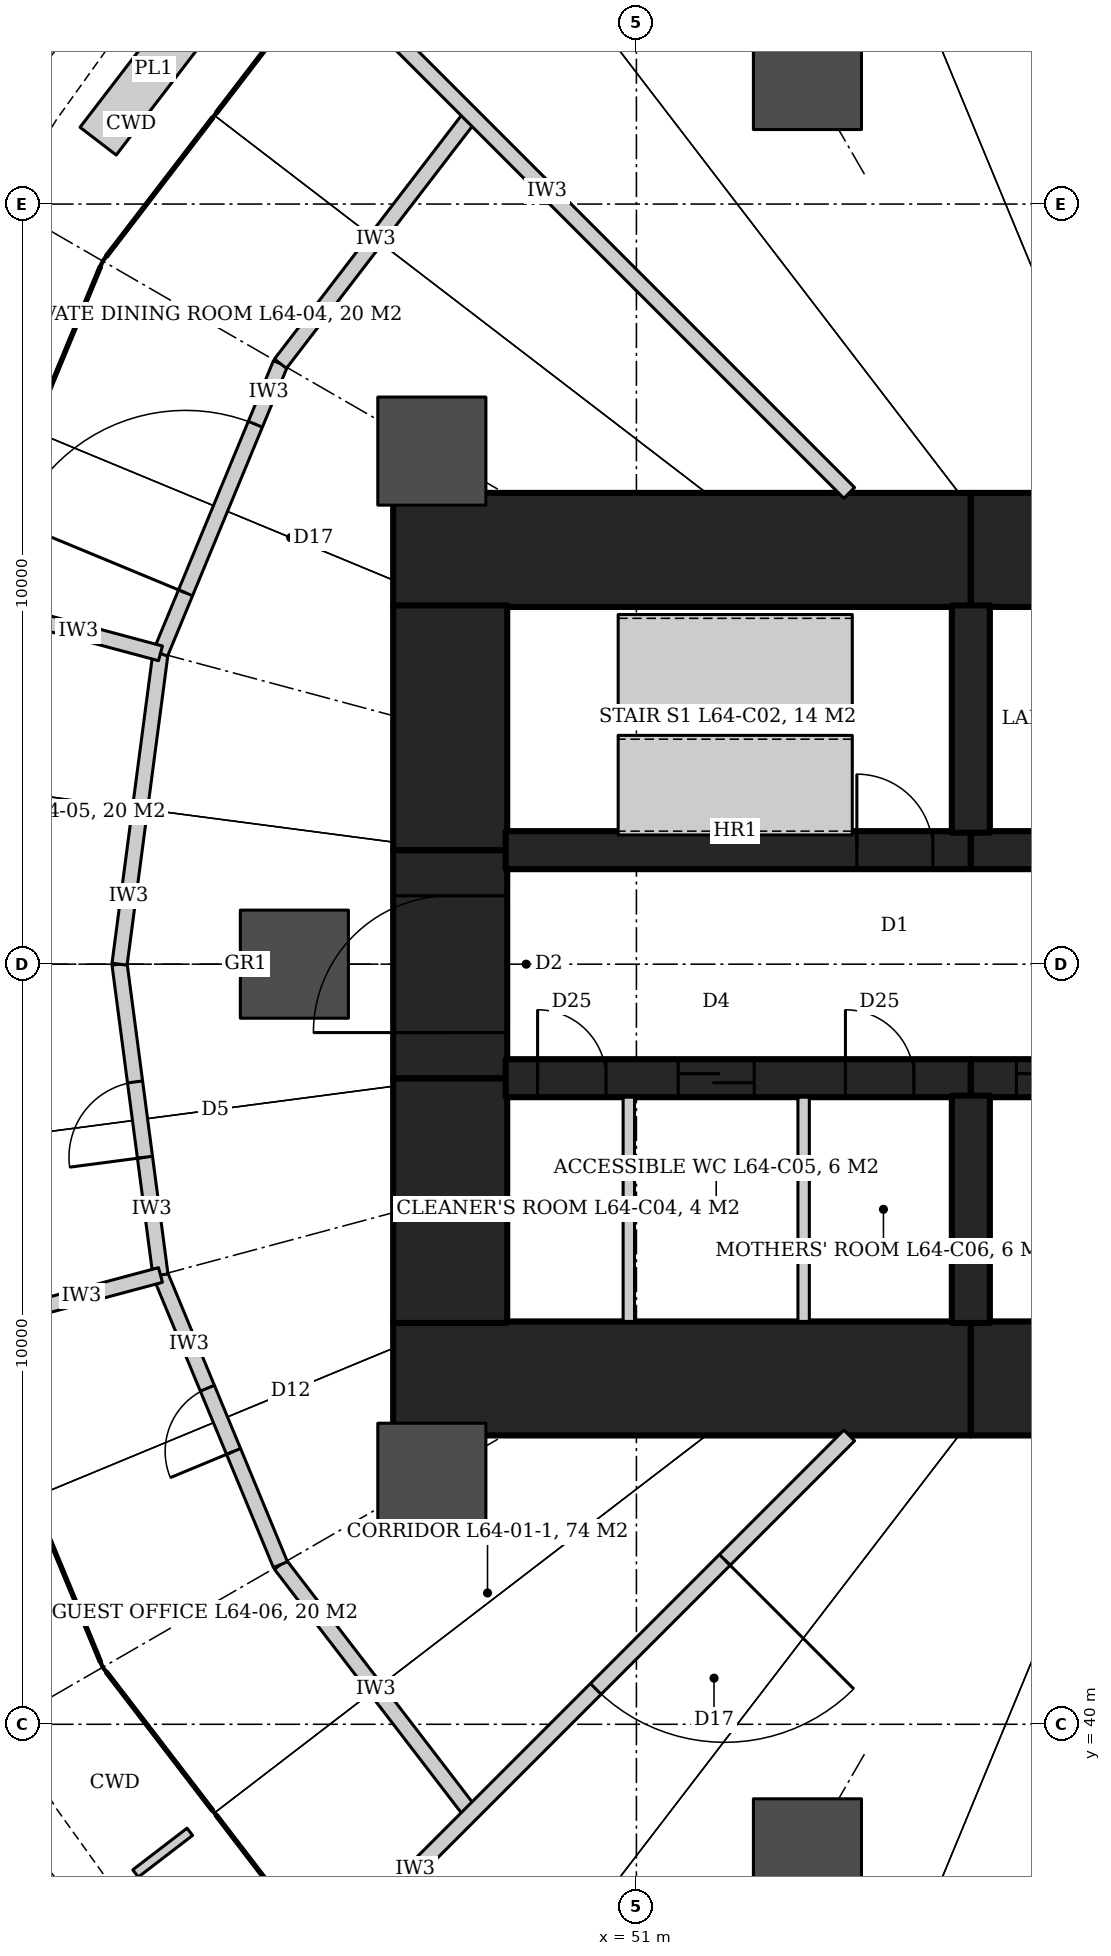
"""IFC4 building model, lengths in metres.
Left out: names, types, materials, properties, quantities, classifications, styles, units other than length and angle.
Written with IfcOpenShell. Run it as: python <this file> out.ifc"""

import sys

from ifc_helpers import new_model, si_unit, direction, frame, frame_2d, origin, origin_2d, place, context, subcontext, project, spatial, rectangle, hollow_circle, extrude, element, fill, save


model = new_model("IFC4")
c1 = context("Model", 3, precision=1e-05, world=origin(), true_north=direction((0.0, 1.0)))
c2 = subcontext(c1, "Body", "Model", "MODEL_VIEW")
j1 = project(units=[si_unit("LENGTHUNIT", "METRE"), si_unit("PLANEANGLEUNIT", "RADIAN")], contexts=[c1])
p1 = place(None, origin())
s1 = spatial("IfcSite", under=j1, at=p1, CompositionType="ELEMENT")
p2 = place(p1, origin())
s2 = spatial("IfcBuilding", under=s1, at=p2, CompositionType="ELEMENT")
p3 = place(p2, frame((0.0, 0.0, 278.0)))
s3 = spatial("IfcBuildingStorey", under=s2, at=p3, CompositionType="ELEMENT", Elevation=278.0)
p4 = place(p3, frame((47.8, 55.45, 0.0), z_axis=(0.0, 0.0, 1.0), x_axis=(1.0, 0.0, 0.0)))
e1 = element("IfcWall", 1, at=p4, inside=s3, PredefinedType="SHEAR", context=c2, shape_type="SweptSolid", body=[
    extrude(rectangle(XDim=7.6, YDim=1.5, at=frame_2d((3.8, 0.0))), origin(), (0.0, 0.0, 1.0), 4.2),
])
p5 = place(p3, frame((55.4, 55.45, 0.0), z_axis=(0.0, 0.0, 1.0), x_axis=(1.0, 0.0, 0.0)))
e2 = element("IfcWall", 2, at=p5, inside=s3, PredefinedType="SHEAR", context=c2, shape_type="SweptSolid", body=[
    extrude(rectangle(XDim=9.2, YDim=1.5, at=frame_2d((4.6, 0.0))), origin(), (0.0, 0.0, 1.0), 4.2),
])
p6 = place(p3, frame((47.8, 44.55, 0.0), z_axis=(0.0, 0.0, 1.0), x_axis=(1.0, 0.0, 0.0)))
e3 = element("IfcWall", 3, at=p6, inside=s3, PredefinedType="SHEAR", context=c2, shape_type="SweptSolid", body=[
    extrude(rectangle(XDim=7.6, YDim=1.5, at=frame_2d((3.8, 0.0))), origin(), (0.0, 0.0, 1.0), 4.2),
])
p7 = place(p3, frame((55.4, 44.55, 0.0), z_axis=(0.0, 0.0, 1.0), x_axis=(1.0, 0.0, 0.0)))
e4 = element("IfcWall", 4, at=p7, inside=s3, PredefinedType="SHEAR", context=c2, shape_type="SweptSolid", body=[
    extrude(rectangle(XDim=9.2, YDim=1.5, at=frame_2d((4.6, 0.0))), origin(), (0.0, 0.0, 1.0), 4.2),
])
p8 = place(p3, frame((48.55, 45.28, 0.0), z_axis=(0.0, 0.0, 1.0), x_axis=(0.0, 1.0, 0.0)))
e5 = element("IfcWall", 5, at=p8, inside=s3, PredefinedType="SHEAR", context=c2, shape_type="SweptSolid", body=[
    extrude(rectangle(XDim=3.22, YDim=1.5, at=frame_2d((1.61, 0.0))), origin(), (0.0, 0.0, 1.0), 4.2),
])
p9 = place(p3, frame((48.55, 48.5, 0.0), z_axis=(0.0, 0.0, 1.0), x_axis=(0.0, 1.0, 0.0)))
e6 = element("IfcWall", 6, at=p9, inside=s3, PredefinedType="SHEAR", context=c2, shape_type="SweptSolid", body=[
    extrude(rectangle(XDim=3.0, YDim=1.5, at=frame_2d((1.5, 0.0))), origin(), (0.0, 0.0, 1.0), 4.2),
])
p10 = place(p9, frame((0.6, 0.0, 0.0)))
e7 = element("IfcOpeningElement", 7, at=p10, cuts=e6, PredefinedType="OPENING", context=c2, shape_type="SweptSolid", body=[
    extrude(rectangle(XDim=1.8, YDim=2.1, at=frame_2d((0.9, 1.05))), frame((0.0, 0.76, 0.0), z_axis=(0.0, -1.0, 0.0), x_axis=(1.0, 0.0, 0.0)), (0.0, 0.0, 1.0), 1.52),
])
p11 = place(p3, frame((48.55, 51.5, 0.0), z_axis=(0.0, 0.0, 1.0), x_axis=(0.0, 1.0, 0.0)))
e8 = element("IfcWall", 8, at=p11, inside=s3, PredefinedType="SHEAR", context=c2, shape_type="SweptSolid", body=[
    extrude(rectangle(XDim=3.22, YDim=1.5, at=frame_2d((1.61, 0.0))), origin(), (0.0, 0.0, 1.0), 4.2),
])
p12 = place(p3, frame((49.28, 51.5, 0.0), z_axis=(0.0, 0.0, 1.0), x_axis=(1.0, 0.0, 0.0)))
e9 = element("IfcWall", 9, at=p12, inside=s3, PredefinedType="SHEAR", context=c2, shape_type="SweptSolid", body=[
    extrude(rectangle(XDim=6.12, YDim=0.5, at=frame_2d((3.06, 0.0))), origin(), (0.0, 0.0, 1.0), 4.2),
])
p13 = place(p12, frame((4.62, 0.0, 0.0)))
e10 = element("IfcOpeningElement", 10, at=p13, cuts=e9, PredefinedType="OPENING", context=c2, shape_type="SweptSolid", body=[
    extrude(rectangle(XDim=1.0, YDim=2.1, at=frame_2d((0.5, 1.05))), frame((0.0, 0.26, 0.0), z_axis=(0.0, -1.0, 0.0), x_axis=(1.0, 0.0, 0.0)), (0.0, 0.0, 1.0), 0.52),
])
p14 = place(p3, frame((55.4, 51.5, 0.0), z_axis=(0.0, 0.0, 1.0), x_axis=(1.0, 0.0, 0.0)))
e11 = element("IfcWall", 11, at=p14, inside=s3, PredefinedType="SHEAR", context=c2, shape_type="SweptSolid", body=[
    extrude(rectangle(XDim=9.2, YDim=0.5, at=frame_2d((4.6, 0.0))), origin(), (0.0, 0.0, 1.0), 4.2),
])
p15 = place(p14, frame((1.036, 0.0, 0.0)))
e12 = element("IfcOpeningElement", 12, at=p15, cuts=e11, PredefinedType="OPENING", context=c2, shape_type="SweptSolid", body=[
    extrude(rectangle(XDim=0.8, YDim=2.1, at=frame_2d((0.4, 1.05))), frame((0.0, 0.26, 0.0), z_axis=(0.0, -1.0, 0.0), x_axis=(1.0, 0.0, 0.0)), (0.0, 0.0, 1.0), 0.52),
])
p16 = place(p14, frame((3.409, 0.0, 0.0)))
e13 = element("IfcOpeningElement", 13, at=p16, cuts=e11, PredefinedType="OPENING", context=c2, shape_type="SweptSolid", body=[
    extrude(rectangle(XDim=0.8, YDim=2.1, at=frame_2d((0.4, 1.05))), frame((0.0, 0.26, 0.0), z_axis=(0.0, -1.0, 0.0), x_axis=(1.0, 0.0, 0.0)), (0.0, 0.0, 1.0), 0.52),
])
p17 = place(p14, frame((6.573, 0.0, 0.0)))
e14 = element("IfcOpeningElement", 14, at=p17, cuts=e11, PredefinedType="OPENING", context=c2, shape_type="SweptSolid", body=[
    extrude(rectangle(XDim=0.8, YDim=2.1, at=frame_2d((0.4, 1.05))), frame((0.0, 0.26, 0.0), z_axis=(0.0, -1.0, 0.0), x_axis=(1.0, 0.0, 0.0)), (0.0, 0.0, 1.0), 0.52),
])
p18 = place(p3, frame((49.28, 48.5, 0.0), z_axis=(0.0, 0.0, 1.0), x_axis=(1.0, 0.0, 0.0)))
e15 = element("IfcWall", 15, at=p18, inside=s3, PredefinedType="SHEAR", context=c2, shape_type="SweptSolid", body=[
    extrude(rectangle(XDim=6.12, YDim=0.5, at=frame_2d((3.06, 0.0))), origin(), (0.0, 0.0, 1.0), 4.2),
])
p19 = place(p18, frame((0.42, 0.0, 0.0)))
e16 = element("IfcOpeningElement", 16, at=p19, cuts=e15, PredefinedType="OPENING", context=c2, shape_type="SweptSolid", body=[
    extrude(rectangle(XDim=0.9, YDim=2.1, at=frame_2d((0.45, 1.05))), frame((0.0, 0.26, 0.0), z_axis=(0.0, -1.0, 0.0), x_axis=(1.0, 0.0, 0.0)), (0.0, 0.0, 1.0), 0.52),
])
p20 = place(p18, frame((2.27, 0.0, 0.0)))
e17 = element("IfcOpeningElement", 17, at=p20, cuts=e15, PredefinedType="OPENING", context=c2, shape_type="SweptSolid", body=[
    extrude(rectangle(XDim=1.0, YDim=2.1, at=frame_2d((0.5, 1.05))), frame((0.0, 0.26, 0.0), z_axis=(0.0, -1.0, 0.0), x_axis=(1.0, 0.0, 0.0)), (0.0, 0.0, 1.0), 0.52),
])
p21 = place(p18, frame((4.47, 0.0, 0.0)))
e18 = element("IfcOpeningElement", 18, at=p21, cuts=e15, PredefinedType="OPENING", context=c2, shape_type="SweptSolid", body=[
    extrude(rectangle(XDim=0.9, YDim=2.1, at=frame_2d((0.45, 1.05))), frame((0.0, 0.26, 0.0), z_axis=(0.0, -1.0, 0.0), x_axis=(1.0, 0.0, 0.0)), (0.0, 0.0, 1.0), 0.52),
])
p22 = place(p3, frame((55.4, 48.5, 0.0), z_axis=(0.0, 0.0, 1.0), x_axis=(1.0, 0.0, 0.0)))
e19 = element("IfcWall", 19, at=p22, inside=s3, PredefinedType="SHEAR", context=c2, shape_type="SweptSolid", body=[
    extrude(rectangle(XDim=9.2, YDim=0.5, at=frame_2d((4.6, 0.0))), origin(), (0.0, 0.0, 1.0), 4.2),
])
p23 = place(p22, frame((0.6, 0.0, 0.0)))
e20 = element("IfcOpeningElement", 20, at=p23, cuts=e19, PredefinedType="OPENING", context=c2, shape_type="SweptSolid", body=[
    extrude(rectangle(XDim=1.1, YDim=2.1, at=frame_2d((0.55, 1.05))), frame((0.0, 0.26, 0.0), z_axis=(0.0, -1.0, 0.0), x_axis=(1.0, 0.0, 0.0)), (0.0, 0.0, 1.0), 0.52),
])
p24 = place(p22, frame((2.9, 0.0, 0.0)))
e21 = element("IfcOpeningElement", 21, at=p24, cuts=e19, PredefinedType="OPENING", context=c2, shape_type="SweptSolid", body=[
    extrude(rectangle(XDim=1.1, YDim=2.1, at=frame_2d((0.55, 1.05))), frame((0.0, 0.26, 0.0), z_axis=(0.0, -1.0, 0.0), x_axis=(1.0, 0.0, 0.0)), (0.0, 0.0, 1.0), 0.52),
])
p25 = place(p22, frame((5.2, 0.0, 0.0)))
e22 = element("IfcOpeningElement", 22, at=p25, cuts=e19, PredefinedType="OPENING", context=c2, shape_type="SweptSolid", body=[
    extrude(rectangle(XDim=1.1, YDim=2.1, at=frame_2d((0.55, 1.05))), frame((0.0, 0.26, 0.0), z_axis=(0.0, -1.0, 0.0), x_axis=(1.0, 0.0, 0.0)), (0.0, 0.0, 1.0), 0.52),
])
p26 = place(p22, frame((7.5, 0.0, 0.0)))
e23 = element("IfcOpeningElement", 23, at=p26, cuts=e19, PredefinedType="OPENING", context=c2, shape_type="SweptSolid", body=[
    extrude(rectangle(XDim=1.1, YDim=2.1, at=frame_2d((0.55, 1.05))), frame((0.0, 0.26, 0.0), z_axis=(0.0, -1.0, 0.0), x_axis=(1.0, 0.0, 0.0)), (0.0, 0.0, 1.0), 0.52),
])
for number, where, z_axis, x_axis in (
    (24, (55.4, 51.73, 0.0), (0.0, 0.0, 1.0), (0.0, 1.0, 0.0)),
    (25, (55.4, 48.27, 0.0), (0.0, 0.0, 1.0), (0.0, -1.0, 0.0)),
):
    element("IfcWall", number, at=place(p3, frame(where, z_axis=z_axis, x_axis=x_axis)), inside=s3, PredefinedType="SHEAR", context=c2, shape_type="SweptSolid", body=[
        extrude(rectangle(XDim=2.99, YDim=0.5, at=frame_2d((1.495, 0.0))), origin(), (0.0, 0.0, 1.0), 4.2),
    ])
for number, where, z_axis, x_axis in (
    (26, (53.25, 61.691, 0.0), (0.0, 0.0, 1.0), (1.0, 0.0, 0.0)),
    (27, (48.309, 56.75, 0.0), (0.0, 0.0, 1.0), (1.0, 0.0, 0.0)),
    (28, (46.5, 50.0, 0.0), (0.0, 0.0, 1.0), (1.0, 0.0, 0.0)),
    (29, (48.309, 43.25, 0.0), (0.0, 0.0, 1.0), (1.0, 0.0, 0.0)),
    (30, (53.25, 38.309, 0.0), (0.0, 0.0, 1.0), (1.0, 0.0, 0.0)),
):
    element("IfcColumn", number, at=place(p3, frame(where, z_axis=z_axis, x_axis=x_axis)), inside=s3, PredefinedType="COLUMN", context=c2, shape_type="SweptSolid", body=[
        extrude(hollow_circle(Radius=0.711, WallThickness=0.07, at=origin_2d()), origin(), (0.0, 0.0, 1.0), 4.2),
    ])
p27 = place(p3, frame((48.828, 38.828, 0.0), z_axis=(0.0, 0.0, 1.0), x_axis=(-0.608714823874, 0.793389099494, 0.0)))
e31 = element("IfcWall", 31, at=p27, inside=s3, PredefinedType="PARTITIONING", context=c2, shape_type="SweptSolid", body=[
    extrude(rectangle(XDim=4.125, YDim=0.2, at=frame_2d((2.062, 0.0))), origin(), (0.0, 0.0, 1.0), 3.02),
])
p28 = place(p3, frame((46.317, 42.1, 0.0), z_axis=(0.0, 0.0, 1.0), x_axis=(-0.382731667114, 0.923859551549, 0.0)))
e32 = element("IfcWall", 32, at=p28, inside=s3, PredefinedType="PARTITIONING", context=c2, shape_type="SweptSolid", body=[
    extrude(rectangle(XDim=4.125, YDim=0.2, at=frame_2d((2.062, 0.0))), origin(), (0.0, 0.0, 1.0), 3.02),
])
p29 = place(p28, frame((1.612, 0.0, 0.0)))
e33 = element("IfcOpeningElement", 33, at=p29, cuts=e32, PredefinedType="OPENING", context=c2, shape_type="SweptSolid", body=[
    extrude(rectangle(XDim=0.9, YDim=2.4, at=frame_2d((0.45, 1.2))), frame((0.0, 0.11, 0.0), z_axis=(0.0, -1.0, 0.0), x_axis=(1.0, 0.0, 0.0)), (0.0, 0.0, 1.0), 0.22),
])
p30 = place(p3, frame((44.738, 45.911, 0.0), z_axis=(0.0, 0.0, 1.0), x_axis=(-0.130515758099, 0.991446234996, 0.0)))
e34 = element("IfcWall", 34, at=p30, inside=s3, PredefinedType="PARTITIONING", context=c2, shape_type="SweptSolid", body=[
    extrude(rectangle(XDim=4.125, YDim=0.2, at=frame_2d((2.062, 0.0))), origin(), (0.0, 0.0, 1.0), 3.02),
])
p31 = place(p30, frame((1.562, 0.0, 0.0)))
e35 = element("IfcOpeningElement", 35, at=p31, cuts=e34, PredefinedType="OPENING", context=c2, shape_type="SweptSolid", body=[
    extrude(rectangle(XDim=1.0, YDim=2.1, at=frame_2d((0.5, 1.05))), frame((0.0, 0.11, 0.0), z_axis=(0.0, -1.0, 0.0), x_axis=(1.0, 0.0, 0.0)), (0.0, 0.0, 1.0), 0.22),
])
p32 = place(p3, frame((44.2, 50.0, 0.0), z_axis=(0.0, 0.0, 1.0), x_axis=(0.130515758099, 0.991446234996, 0.0)))
e36 = element("IfcWall", 36, at=p32, inside=s3, PredefinedType="PARTITIONING", context=c2, shape_type="SweptSolid", body=[
    extrude(rectangle(XDim=4.125, YDim=0.2, at=frame_2d((2.062, 0.0))), origin(), (0.0, 0.0, 1.0), 3.02),
])
p33 = place(p3, frame((44.738, 54.089, 0.0), z_axis=(0.0, 0.0, 1.0), x_axis=(0.382731667114, 0.923859551549, 0.0)))
e37 = element("IfcWall", 37, at=p33, inside=s3, PredefinedType="PARTITIONING", context=c2, shape_type="SweptSolid", body=[
    extrude(rectangle(XDim=4.125, YDim=0.2, at=frame_2d((2.062, 0.0))), origin(), (0.0, 0.0, 1.0), 3.02),
])
p34 = place(p33, frame((0.862, 0.0, 0.0)))
e38 = element("IfcOpeningElement", 38, at=p34, cuts=e37, PredefinedType="OPENING", context=c2, shape_type="SweptSolid", body=[
    extrude(rectangle(XDim=2.4, YDim=2.4, at=frame_2d((1.2, 1.2))), frame((0.0, 0.11, 0.0), z_axis=(0.0, -1.0, 0.0), x_axis=(1.0, 0.0, 0.0)), (0.0, 0.0, 1.0), 0.22),
])
p35 = place(p3, frame((46.317, 57.9, 0.0), z_axis=(0.0, 0.0, 1.0), x_axis=(0.608714823874, 0.793389099494, 0.0)))
e39 = element("IfcWall", 39, at=p35, inside=s3, PredefinedType="PARTITIONING", context=c2, shape_type="SweptSolid", body=[
    extrude(rectangle(XDim=4.125, YDim=0.2, at=frame_2d((2.062, 0.0))), origin(), (0.0, 0.0, 1.0), 3.02),
])
p36 = place(p3, frame((53.8, 56.2, 0.0), z_axis=(0.0, 0.0, 1.0), x_axis=(-0.707106781187, 0.707106781187, 0.0)))
e40 = element("IfcWall", 40, at=p36, inside=s3, PredefinedType="PARTITIONING", context=c2, shape_type="SweptSolid", body=[
    extrude(rectangle(XDim=9.692, YDim=0.2, at=frame_2d((4.846, 0.0))), origin(), (0.0, 0.0, 1.0), 3.02),
])
p37 = place(p3, frame((44.738, 54.089, 0.0), z_axis=(0.0, 0.0, 1.0), x_axis=(-0.965923469749, 0.25882783967, 0.0)))
e41 = element("IfcWall", 41, at=p37, inside=s3, PredefinedType="PARTITIONING", context=c2, shape_type="SweptSolid", body=[
    extrude(rectangle(XDim=2.66, YDim=0.2, at=frame_2d((1.33, 0.0))), origin(), (0.0, 0.0, 1.0), 3.02),
])
p38 = place(p3, frame((44.738, 45.911, 0.0), z_axis=(0.0, 0.0, 1.0), x_axis=(-0.965920805306, -0.258837782939, 0.0)))
e42 = element("IfcWall", 42, at=p38, inside=s3, PredefinedType="PARTITIONING", context=c2, shape_type="SweptSolid", body=[
    extrude(rectangle(XDim=2.56, YDim=0.2, at=frame_2d((1.28, 0.0))), origin(), (0.0, 0.0, 1.0), 3.02),
])
p39 = place(p3, frame((53.8, 43.8, 0.0), z_axis=(0.0, 0.0, 1.0), x_axis=(-0.707106781187, -0.707106781187, 0.0)))
e43 = element("IfcWall", 43, at=p39, inside=s3, PredefinedType="PARTITIONING", context=c2, shape_type="SweptSolid", body=[
    extrude(rectangle(XDim=9.692, YDim=0.2, at=frame_2d((4.846, 0.0))), origin(), (0.0, 0.0, 1.0), 3.02),
])
p40 = place(p39, frame((2.316, 0.0, 0.0)))
e44 = element("IfcOpeningElement", 44, at=p40, cuts=e43, PredefinedType="OPENING", context=c2, shape_type="SweptSolid", body=[
    extrude(rectangle(XDim=2.4, YDim=2.4, at=frame_2d((1.2, 1.2))), frame((0.0, 0.11, 0.0), z_axis=(0.0, -1.0, 0.0), x_axis=(1.0, 0.0, 0.0)), (0.0, 0.0, 1.0), 0.22),
])
for number, where, z_axis, x_axis in (
    (45, (50.9, 45.3, 0.0), (0.0, 0.0, 1.0), (0.0, 1.0, 0.0)),
    (46, (53.2, 45.3, 0.0), (0.0, 0.0, 1.0), (0.0, 1.0, 0.0)),
):
    element("IfcWall", number, at=place(p3, frame(where, z_axis=z_axis, x_axis=x_axis)), inside=s3, PredefinedType="PARTITIONING", context=c2, shape_type="SweptSolid", body=[
        extrude(rectangle(XDim=2.95, YDim=0.15, at=frame_2d((1.475, 0.0))), origin(), (0.0, 0.0, 1.0), 4.04),
    ])
p41 = place(p34, origin())
e47 = element("IfcDoor", 47, at=p41, inside=s3, OperationType="DOUBLE_DOOR_DOUBLE_SWING", PredefinedType="DOOR", context=c2, shape_type="SweptSolid", body=[
    extrude(rectangle(XDim=2.4, YDim=2.4, at=frame_2d((1.2, 1.2))), frame((0.0, 0.025, 0.0), z_axis=(0.0, -1.0, 0.0), x_axis=(1.0, 0.0, 0.0)), (0.0, 0.0, 1.0), 0.05),
])
fill(e38, e47)
p42 = place(p31, origin())
e48 = element("IfcDoor", 48, at=p42, inside=s3, OperationType="SINGLE_SWING_LEFT", PredefinedType="DOOR", context=c2, shape_type="SweptSolid", body=[
    extrude(rectangle(XDim=1.0, YDim=2.1, at=frame_2d((0.5, 1.05))), frame((0.0, 0.025, 0.0), z_axis=(0.0, -1.0, 0.0), x_axis=(1.0, 0.0, 0.0)), (0.0, 0.0, 1.0), 0.05),
])
fill(e35, e48)
p43 = place(p29, origin())
e49 = element("IfcDoor", 49, at=p43, inside=s3, OperationType="SINGLE_SWING_LEFT", PredefinedType="DOOR", context=c2, shape_type="SweptSolid", body=[
    extrude(rectangle(XDim=0.9, YDim=2.4, at=frame_2d((0.45, 1.2))), frame((0.0, 0.025, 0.0), z_axis=(0.0, -1.0, 0.0), x_axis=(1.0, 0.0, 0.0)), (0.0, 0.0, 1.0), 0.05),
])
fill(e33, e49)
p44 = place(p40, origin())
e50 = element("IfcDoor", 50, at=p44, inside=s3, OperationType="DOUBLE_DOOR_DOUBLE_SWING", PredefinedType="DOOR", context=c2, shape_type="SweptSolid", body=[
    extrude(rectangle(XDim=2.4, YDim=2.4, at=frame_2d((1.2, 1.2))), frame((0.0, 0.025, 0.0), z_axis=(0.0, -1.0, 0.0), x_axis=(1.0, 0.0, 0.0)), (0.0, 0.0, 1.0), 0.05),
])
fill(e44, e50)
p45 = place(p13, origin())
e51 = element("IfcDoor", 51, at=p45, inside=s3, OperationType="SINGLE_SWING_LEFT", PredefinedType="DOOR", context=c2, shape_type="SweptSolid", body=[
    extrude(rectangle(XDim=1.0, YDim=2.1, at=frame_2d((0.5, 1.05))), frame((0.0, 0.025, 0.0), z_axis=(0.0, -1.0, 0.0), x_axis=(1.0, 0.0, 0.0)), (0.0, 0.0, 1.0), 0.05),
])
fill(e10, e51)
p46 = place(p23, origin())
e52 = element("IfcDoor", 52, at=p46, inside=s3, OperationType="SLIDING_TO_LEFT", PredefinedType="DOOR", context=c2, shape_type="SweptSolid", body=[
    extrude(rectangle(XDim=1.1, YDim=2.1, at=frame_2d((0.55, 1.05))), frame((0.0, 0.025, 0.0), z_axis=(0.0, -1.0, 0.0), x_axis=(1.0, 0.0, 0.0)), (0.0, 0.0, 1.0), 0.05),
])
fill(e20, e52)
p47 = place(p19, origin())
e53 = element("IfcDoor", 53, at=p47, inside=s3, OperationType="SINGLE_SWING_RIGHT", PredefinedType="DOOR", context=c2, shape_type="SweptSolid", body=[
    extrude(rectangle(XDim=0.9, YDim=2.1, at=frame_2d((0.45, 1.05))), frame((0.0, 0.025, 0.0), z_axis=(0.0, -1.0, 0.0), x_axis=(1.0, 0.0, 0.0)), (0.0, 0.0, 1.0), 0.05),
])
fill(e16, e53)
p48 = place(p20, origin())
e54 = element("IfcDoor", 54, at=p48, inside=s3, OperationType="SLIDING_TO_LEFT", PredefinedType="DOOR", context=c2, shape_type="SweptSolid", body=[
    extrude(rectangle(XDim=1.0, YDim=2.1, at=frame_2d((0.5, 1.05))), frame((0.0, 0.025, 0.0), z_axis=(0.0, -1.0, 0.0), x_axis=(1.0, 0.0, 0.0)), (0.0, 0.0, 1.0), 0.05),
])
fill(e17, e54)
p49 = place(p21, origin())
e55 = element("IfcDoor", 55, at=p49, inside=s3, OperationType="SINGLE_SWING_RIGHT", PredefinedType="DOOR", context=c2, shape_type="SweptSolid", body=[
    extrude(rectangle(XDim=0.9, YDim=2.1, at=frame_2d((0.45, 1.05))), frame((0.0, 0.025, 0.0), z_axis=(0.0, -1.0, 0.0), x_axis=(1.0, 0.0, 0.0)), (0.0, 0.0, 1.0), 0.05),
])
fill(e18, e55)
p50 = place(p10, origin())
e56 = element("IfcDoor", 56, at=p50, inside=s3, OperationType="DOUBLE_DOOR_DOUBLE_SWING", PredefinedType="DOOR", context=c2, shape_type="SweptSolid", body=[
    extrude(rectangle(XDim=1.8, YDim=2.1, at=frame_2d((0.9, 1.05))), frame((0.0, 0.025, 0.0), z_axis=(0.0, -1.0, 0.0), x_axis=(1.0, 0.0, 0.0)), (0.0, 0.0, 1.0), 0.05),
])
fill(e7, e56)
save(model, sys.argv[1])
